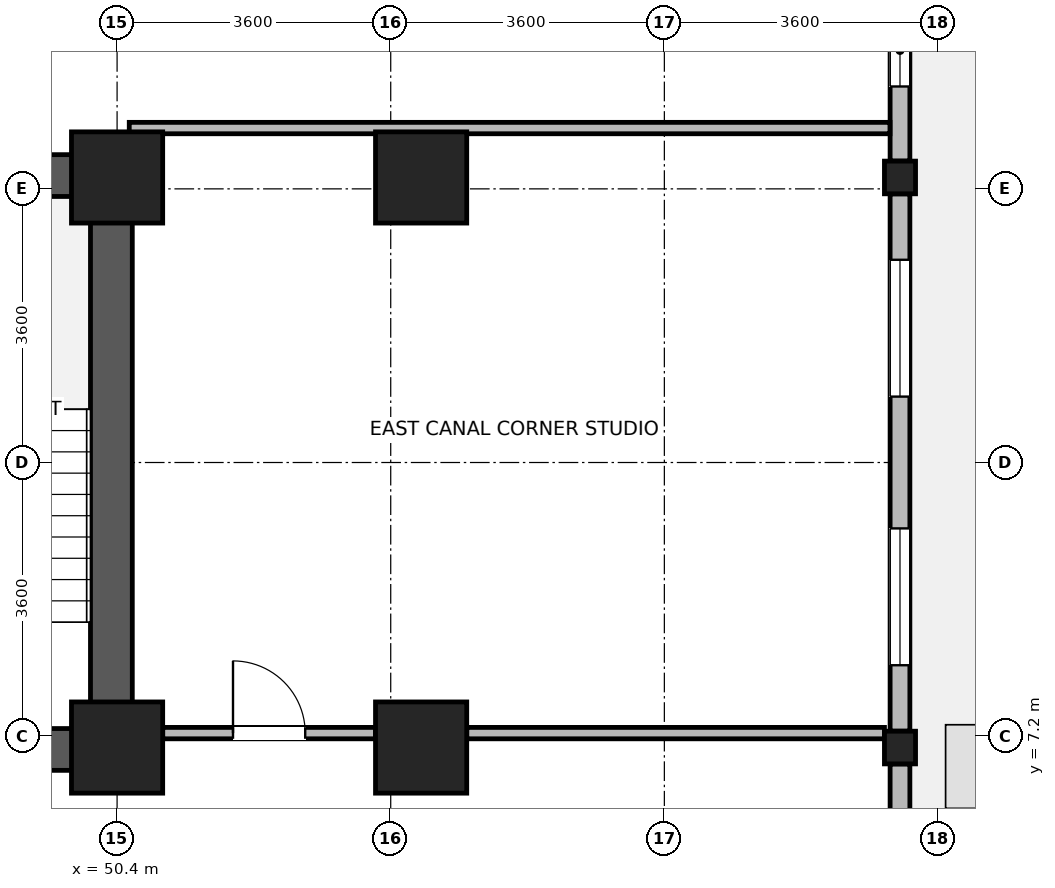
"""IFC4 building model, lengths in metres.
Left out: names, types, materials, properties, quantities, classifications, styles, units other than length and angle.
Written with IfcOpenShell. Run it as: python <this file> out.ifc"""

import sys

from ifc_helpers import new_model, si_unit, direction, frame, frame_2d, origin, origin_2d, place, context, subcontext, project, spatial, rectangle, i_section, extrude, source, transform, mapped, element, fill, save


model = new_model("IFC4")
c1 = context("Model", 3, precision=1e-05, world=origin(), true_north=direction((0.0, 1.0)))
c2 = subcontext(c1, "Body", "Model", "MODEL_VIEW")
j1 = project(units=[si_unit("LENGTHUNIT", "METRE"), si_unit("PLANEANGLEUNIT", "RADIAN")], contexts=[c1])
p1 = place(None, origin())
s1 = spatial("IfcSite", under=j1, at=p1, CompositionType="ELEMENT")
p2 = place(p1, origin())
s2 = spatial("IfcBuilding", under=s1, at=p2, CompositionType="ELEMENT")
p3 = place(p2, frame((0.0, 0.0, 86.0)))
s3 = spatial("IfcBuildingStorey", under=s2, at=p3, CompositionType="ELEMENT", Elevation=86.0)
p4 = place(p3, frame((50.325, 6.75, 0.0), z_axis=(0.0, 0.0, 1.0), x_axis=(0.0, 1.0, 0.0)))
e1 = element("IfcWall", 1, at=p4, inside=s3, PredefinedType="SHEAR", context=c2, shape_type="SweptSolid", body=[
    extrude(rectangle(XDim=8.1, YDim=0.55, at=frame_2d((4.05, 0.0))), origin(), (0.0, 0.0, 1.0), 3.45),
])
for number, where, z_axis, x_axis in (
    (2, (46.85, 7.025, 0.0), (0.0, 0.0, 1.0), (1.0, 0.0, 0.0)),
    (3, (46.85, 14.575, 0.0), (0.0, 0.0, 1.0), (1.0, 0.0, 0.0)),
):
    element("IfcWall", number, at=place(p3, frame(where, z_axis=z_axis, x_axis=x_axis)), inside=s3, PredefinedType="SHEAR", context=c2, shape_type="SweptSolid", body=[
        extrude(rectangle(XDim=3.2, YDim=0.55, at=frame_2d((1.6, 0.0))), origin(), (0.0, 0.0, 1.0), 3.45),
    ])
m1 = source(origin(), c2, "Body", "SweptSolid", [
    extrude(rectangle(XDim=1.2, YDim=1.2, at=origin_2d()), origin(), (0.0, 0.0, 1.0), 3.7),
])
for number, where, z_axis, x_axis in (
    (4, (50.4, 7.05, 0.0), (0.0, 0.0, 1.0), (1.0, 0.0, 0.0)),
    (5, (50.4, 14.55, 0.0), (0.0, 0.0, 1.0), (1.0, 0.0, 0.0)),
    (6, (54.4, 7.05, 0.0), (0.0, 0.0, 1.0), (1.0, 0.0, 0.0)),
    (7, (54.4, 14.55, 0.0), (0.0, 0.0, 1.0), (1.0, 0.0, 0.0)),
):
    element("IfcColumn", number, at=place(p3, frame(where, z_axis=z_axis, x_axis=x_axis)), inside=s3, PredefinedType="COLUMN", context=c2, shape_type="MappedRepresentation", body=[
        mapped(m1, transform((0.0, 0.0, 0.0), x_axis=(1.0, 0.0, 0.0), y_axis=(0.0, 1.0, 0.0), z_axis=(0.0, 0.0, 1.0), scale=1.0)),
    ])
m2 = source(origin(), c2, "Body", "SweptSolid", [
    extrude(i_section(OverallWidth=0.409, OverallDepth=0.43, WebThickness=0.024, FlangeThickness=0.033, FilletRadius=0.015, at=origin_2d()), origin(), (0.0, 0.0, 1.0), 3.7),
])
for number, where, z_axis, x_axis in (
    (8, (60.7, 7.05, 0.0), (0.0, 0.0, 1.0), (1.0, 0.0, 0.0)),
    (9, (60.7, 14.55, 0.0), (0.0, 0.0, 1.0), (1.0, 0.0, 0.0)),
):
    element("IfcColumn", number, at=place(p3, frame(where, z_axis=z_axis, x_axis=x_axis)), inside=s3, PredefinedType="COLUMN", context=c2, shape_type="MappedRepresentation", body=[
        mapped(m2, transform((0.0, 0.0, 0.0), x_axis=(1.0, 0.0, 0.0), y_axis=(0.0, 1.0, 0.0), z_axis=(0.0, 0.0, 1.0), scale=1.0)),
    ])
p5 = place(p3, frame((60.7, 6.834, 0.0), z_axis=(0.0, 0.0, 1.0), x_axis=(0.0, -1.0, 0.0)))
e10 = element("IfcWall", 10, at=p5, inside=s3, PredefinedType="STANDARD", context=c2, shape_type="SweptSolid", body=[
    extrude(rectangle(XDim=5.164, YDim=0.26, at=frame_2d((2.582, 0.0))), origin(), (0.0, 0.0, 1.0), 3.43),
])
p6 = place(p5, frame((2.865, 0.0, 0.0)))
e11 = element("IfcOpeningElement", 11, at=p6, cuts=e10, PredefinedType="OPENING", context=c2, shape_type="SweptSolid", body=[
    extrude(rectangle(XDim=1.5, YDim=2.15, at=frame_2d((0.75, 1.075))), frame((0.0, 0.14, 0.0), z_axis=(0.0, -1.0, 0.0), x_axis=(1.0, 0.0, 0.0)), (0.0, 0.0, 1.0), 0.28),
])
p7 = place(p3, frame((60.7, 14.334, 0.0), z_axis=(0.0, 0.0, 1.0), x_axis=(0.0, -1.0, 0.0)))
e12 = element("IfcWall", 12, at=p7, inside=s3, PredefinedType="STANDARD", context=c2, shape_type="SweptSolid", body=[
    extrude(rectangle(XDim=7.068, YDim=0.26, at=frame_2d((3.534, 0.0))), origin(), (0.0, 0.0, 1.0), 2.93),
])
p8 = place(p7, frame((0.867, 0.0, 0.85)))
e13 = element("IfcOpeningElement", 13, at=p8, cuts=e12, PredefinedType="OPENING", context=c2, shape_type="SweptSolid", body=[
    extrude(rectangle(XDim=1.8, YDim=1.85, at=frame_2d((0.9, 0.925))), frame((0.0, 0.14, 0.0), z_axis=(0.0, -1.0, 0.0), x_axis=(1.0, 0.0, 0.0)), (0.0, 0.0, 1.0), 0.28),
])
p9 = place(p7, frame((4.401, 0.0, 0.85)))
e14 = element("IfcOpeningElement", 14, at=p9, cuts=e12, PredefinedType="OPENING", context=c2, shape_type="SweptSolid", body=[
    extrude(rectangle(XDim=1.8, YDim=1.85, at=frame_2d((0.9, 0.925))), frame((0.0, 0.14, 0.0), z_axis=(0.0, -1.0, 0.0), x_axis=(1.0, 0.0, 0.0)), (0.0, 0.0, 1.0), 0.28),
])
p10 = place(p3, frame((60.7, 21.384, 0.0), z_axis=(0.0, 0.0, 1.0), x_axis=(0.0, -1.0, 0.0)))
e15 = element("IfcWall", 15, at=p10, inside=s3, PredefinedType="STANDARD", context=c2, shape_type="SweptSolid", body=[
    extrude(rectangle(XDim=6.618, YDim=0.26, at=frame_2d((3.309, 0.0))), origin(), (0.0, 0.0, 1.0), 2.93),
])
p11 = place(p10, frame((0.754, 0.0, 0.85)))
e16 = element("IfcOpeningElement", 16, at=p11, cuts=e15, PredefinedType="OPENING", context=c2, shape_type="SweptSolid", body=[
    extrude(rectangle(XDim=1.8, YDim=1.85, at=frame_2d((0.9, 0.925))), frame((0.0, 0.14, 0.0), z_axis=(0.0, -1.0, 0.0), x_axis=(1.0, 0.0, 0.0)), (0.0, 0.0, 1.0), 0.28),
])
p12 = place(p10, frame((4.687, 0.0, 0.85)))
e17 = element("IfcOpeningElement", 17, at=p12, cuts=e15, PredefinedType="OPENING", context=c2, shape_type="SweptSolid", body=[
    extrude(rectangle(XDim=0.95, YDim=1.75, at=frame_2d((0.475, 0.875))), frame((0.0, 0.14, 0.0), z_axis=(0.0, -1.0, 0.0), x_axis=(1.0, 0.0, 0.0)), (0.0, 0.0, 1.0), 0.28),
])
p13 = place(p3, frame((51.0, 7.24, 0.0), z_axis=(0.0, 0.0, 1.0), x_axis=(1.0, 0.0, 0.0)))
e18 = element("IfcWall", 18, at=p13, inside=s3, PredefinedType="PARTITIONING", context=c2, shape_type="SweptSolid", body=[
    extrude(rectangle(XDim=2.8, YDim=0.15, at=frame_2d((1.4, 0.0))), origin(), (0.0, 0.0, 1.0), 2.78),
])
p14 = place(p13, frame((0.925, 0.0, 0.0)))
e19 = element("IfcOpeningElement", 19, at=p14, cuts=e18, PredefinedType="OPENING", context=c2, shape_type="SweptSolid", body=[
    extrude(rectangle(XDim=0.95, YDim=2.1, at=frame_2d((0.475, 1.05))), frame((0.0, 0.085, 0.0), z_axis=(0.0, -1.0, 0.0), x_axis=(1.0, 0.0, 0.0)), (0.0, 0.0, 1.0), 0.17),
])
p15 = place(p3, frame((55.0, 7.24, 0.0), z_axis=(0.0, 0.0, 1.0), x_axis=(1.0, 0.0, 0.0)))
e20 = element("IfcWall", 20, at=p15, inside=s3, PredefinedType="PARTITIONING", context=c2, shape_type="SweptSolid", body=[
    extrude(rectangle(XDim=5.496, YDim=0.15, at=frame_2d((2.748, 0.0))), origin(), (0.0, 0.0, 1.0), 2.78),
])
p16 = place(p3, frame((50.56, 15.2, 0.0), z_axis=(0.0, 0.0, 1.0), x_axis=(1.0, 0.0, 0.0)))
e21 = element("IfcWall", 21, at=p16, inside=s3, PredefinedType="PARTITIONING", context=c2, shape_type="SweptSolid", body=[
    extrude(rectangle(XDim=10.008, YDim=0.15, at=frame_2d((5.004, 0.0))), origin(), (0.0, 0.0, 1.0), 3.43),
])
p17 = place(p8, origin())
e22 = element("IfcWindow", 22, at=p17, inside=s3, PartitioningType="SINGLE_PANEL", PredefinedType="WINDOW", context=c2, shape_type="SweptSolid", body=[
    extrude(rectangle(XDim=1.8, YDim=1.85, at=frame_2d((0.9, 0.925))), frame((0.0, 0.03, 0.0), z_axis=(0.0, -1.0, 0.0), x_axis=(1.0, 0.0, 0.0)), (0.0, 0.0, 1.0), 0.06),
])
fill(e13, e22)
p18 = place(p9, origin())
e23 = element("IfcWindow", 23, at=p18, inside=s3, PartitioningType="SINGLE_PANEL", PredefinedType="WINDOW", context=c2, shape_type="SweptSolid", body=[
    extrude(rectangle(XDim=1.8, YDim=1.85, at=frame_2d((0.9, 0.925))), frame((0.0, 0.03, 0.0), z_axis=(0.0, -1.0, 0.0), x_axis=(1.0, 0.0, 0.0)), (0.0, 0.0, 1.0), 0.06),
])
fill(e14, e23)
p19 = place(p12, origin())
e24 = element("IfcWindow", 24, at=p19, inside=s3, PartitioningType="SINGLE_PANEL", PredefinedType="WINDOW", context=c2, shape_type="SweptSolid", body=[
    extrude(rectangle(XDim=0.95, YDim=1.75, at=frame_2d((0.475, 0.875))), frame((0.0, 0.03, 0.0), z_axis=(0.0, -1.0, 0.0), x_axis=(1.0, 0.0, 0.0)), (0.0, 0.0, 1.0), 0.06),
])
fill(e17, e24)
p20 = place(p14, origin())
e25 = element("IfcDoor", 25, at=p20, inside=s3, OperationType="SINGLE_SWING_LEFT", PredefinedType="DOOR", context=c2, shape_type="SweptSolid", body=[
    extrude(rectangle(XDim=0.95, YDim=2.1, at=frame_2d((0.475, 1.05))), frame((0.0, 0.025, 0.0), z_axis=(0.0, -1.0, 0.0), x_axis=(1.0, 0.0, 0.0)), (0.0, 0.0, 1.0), 0.05),
])
fill(e19, e25)
save(model, sys.argv[1])
